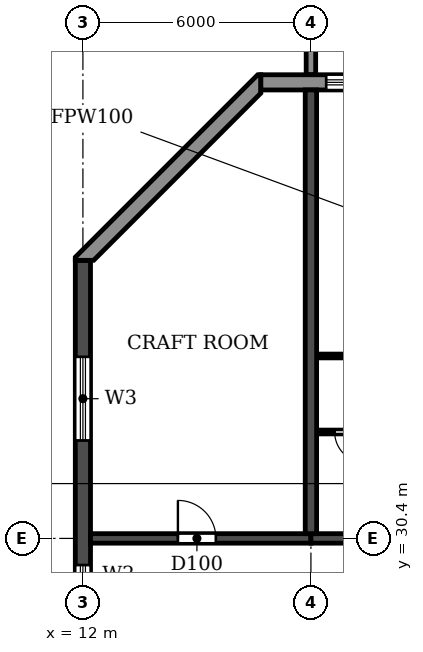
"""IFC4 building model, lengths in metres.
Left out: names, types, materials, properties, quantities, classifications, styles, units other than length and angle.
Written with IfcOpenShell. Run it as: python <this file> out.ifc"""

import sys

from ifc_helpers import new_model, si_unit, direction, frame, frame_2d, origin, place, context, subcontext, project, spatial, polyline, rectangle, outline, extrude, source, transform, mapped, element, fill, save


model = new_model("IFC4")
c1 = context("Model", 3, precision=1e-05, world=origin(), true_north=direction((0.0, 1.0)))
c2 = subcontext(c1, "Body", "Model", "MODEL_VIEW")
j1 = project(units=[si_unit("LENGTHUNIT", "METRE"), si_unit("PLANEANGLEUNIT", "RADIAN")], contexts=[c1])
p1 = place(None, origin())
s1 = spatial("IfcSite", under=j1, at=p1, CompositionType="ELEMENT")
p2 = place(p1, origin())
s2 = spatial("IfcBuilding", under=s1, at=p2, CompositionType="ELEMENT")
p3 = place(p2, frame((0.0, 0.0, 125.7)))
s3 = spatial("IfcBuildingStorey", under=s2, at=p3, CompositionType="ELEMENT", Elevation=125.7)
p4 = place(p3, frame((18.0, 30.525, 0.0), z_axis=(0.0, 0.0, 1.0), x_axis=(0.0, 1.0, 0.0)))
e1 = element("IfcWall", 1, at=p4, inside=s3, PredefinedType="SHEAR", context=c2, shape_type="SweptSolid", body=[
    extrude(rectangle(XDim=11.675, YDim=0.3, at=frame_2d((5.837, 0.0))), origin(), (0.0, 0.0, 1.0), 3.07),
])
p5 = place(p3, frame((12.0, 4.683, 0.0), z_axis=(0.0, 0.0, 1.0), x_axis=(0.0, 1.0, 0.0)))
e2 = element("IfcWall", 2, at=p5, inside=s3, PredefinedType="SHEAR", context=c2, shape_type="SweptSolid", body=[
    extrude(rectangle(XDim=33.034, YDim=0.4, at=frame_2d((16.517, 0.0))), origin(), (0.0, 0.0, 1.0), 3.07),
])
p6 = place(p5, frame((23.817, 0.0, 0.9)))
e3 = element("IfcOpeningElement", 3, at=p6, cuts=e2, PredefinedType="OPENING", context=c2, shape_type="SweptSolid", body=[
    extrude(rectangle(XDim=1.2, YDim=1.5, at=frame_2d((0.6, 0.75))), frame((0.0, 0.21, 0.0), z_axis=(0.0, -1.0, 0.0), x_axis=(1.0, 0.0, 0.0)), (0.0, 0.0, 1.0), 0.42),
])
p7 = place(p5, frame((8.017, 0.0, 0.9)))
e4 = element("IfcOpeningElement", 4, at=p7, cuts=e2, PredefinedType="OPENING", context=c2, shape_type="SweptSolid", body=[
    extrude(rectangle(XDim=1.2, YDim=1.5, at=frame_2d((0.6, 0.75))), frame((0.0, 0.21, 0.0), z_axis=(0.0, -1.0, 0.0), x_axis=(1.0, 0.0, 0.0)), (0.0, 0.0, 1.0), 0.42),
])
p8 = place(p5, frame((28.293, 0.0, 0.6)))
e5 = element("IfcOpeningElement", 5, at=p8, cuts=e2, PredefinedType="OPENING", context=c2, shape_type="SweptSolid", body=[
    extrude(rectangle(XDim=2.2, YDim=1.8, at=frame_2d((1.1, 0.9))), frame((0.0, 0.21, 0.0), z_axis=(0.0, -1.0, 0.0), x_axis=(1.0, 0.0, 0.0)), (0.0, 0.0, 1.0), 0.42),
])
p9 = place(p5, frame((2.541, 0.0, 0.6)))
e6 = element("IfcOpeningElement", 6, at=p9, cuts=e2, PredefinedType="OPENING", context=c2, shape_type="SweptSolid", body=[
    extrude(rectangle(XDim=2.2, YDim=1.8, at=frame_2d((1.1, 0.9))), frame((0.0, 0.21, 0.0), z_axis=(0.0, -1.0, 0.0), x_axis=(1.0, 0.0, 0.0)), (0.0, 0.0, 1.0), 0.42),
])
p10 = place(p5, frame((12.817, 0.0, 0.6)))
e7 = element("IfcOpeningElement", 7, at=p10, cuts=e2, PredefinedType="OPENING", context=c2, shape_type="SweptSolid", body=[
    extrude(rectangle(XDim=2.2, YDim=1.8, at=frame_2d((1.1, 0.9))), frame((0.0, 0.21, 0.0), z_axis=(0.0, -1.0, 0.0), x_axis=(1.0, 0.0, 0.0)), (0.0, 0.0, 1.0), 0.42),
])
p11 = place(p3, frame((12.2, 30.4, 0.0), z_axis=(0.0, 0.0, 1.0), x_axis=(1.0, 0.0, 0.0)))
e8 = element("IfcWall", 8, at=p11, inside=s3, PredefinedType="SHEAR", context=c2, shape_type="SweptSolid", body=[
    extrude(rectangle(XDim=5.8, YDim=0.25, at=frame_2d((2.9, 0.0))), origin(), (0.0, 0.0, 1.0), 2.47),
])
p12 = place(p11, frame((2.3, 0.0, 0.0)))
e9 = element("IfcOpeningElement", 9, at=p12, cuts=e8, PredefinedType="OPENING", context=c2, shape_type="SweptSolid", body=[
    extrude(rectangle(XDim=1.0, YDim=2.1, at=frame_2d((0.5, 1.05))), frame((0.0, 0.135, 0.0), z_axis=(0.0, -1.0, 0.0), x_axis=(1.0, 0.0, 0.0)), (0.0, 0.0, 1.0), 0.27),
])
p13 = place(p3, frame((18.0, 30.4, 0.0), z_axis=(0.0, 0.0, 1.0), x_axis=(1.0, 0.0, 0.0)))
e10 = element("IfcWall", 10, at=p13, inside=s3, PredefinedType="SHEAR", context=c2, shape_type="SweptSolid", body=[
    extrude(rectangle(XDim=6.0, YDim=0.25, at=frame_2d((3.0, 0.0))), origin(), (0.0, 0.0, 1.0), 2.47),
])
p14 = place(p13, frame((2.45, 0.0, 0.0)))
e11 = element("IfcOpeningElement", 11, at=p14, cuts=e10, PredefinedType="OPENING", context=c2, shape_type="SweptSolid", body=[
    extrude(rectangle(XDim=1.0, YDim=2.1, at=frame_2d((0.5, 1.05))), frame((0.0, 0.135, 0.0), z_axis=(0.0, -1.0, 0.0), x_axis=(1.0, 0.0, 0.0)), (0.0, 0.0, 1.0), 0.27),
])
p15 = place(p3, frame((85.317, 42.4, 0.0), z_axis=(0.0, 0.0, 1.0), x_axis=(-1.0, 0.0, 0.0)))
e12 = element("IfcWall", 12, at=p15, inside=s3, PredefinedType="STANDARD", context=c2, shape_type="SweptSolid", body=[
    extrude(rectangle(XDim=68.634, YDim=0.4, at=frame_2d((34.317, 0.0))), origin(), (0.0, 0.0, 1.0), 3.07),
])
p16 = place(p15, frame((64.717, 0.0, 0.9)))
e13 = element("IfcOpeningElement", 13, at=p16, cuts=e12, PredefinedType="OPENING", context=c2, shape_type="SweptSolid", body=[
    extrude(rectangle(XDim=2.2, YDim=1.5, at=frame_2d((1.1, 0.75))), frame((0.0, 0.21, 0.0), z_axis=(0.0, -1.0, 0.0), x_axis=(1.0, 0.0, 0.0)), (0.0, 0.0, 1.0), 0.42),
])
p17 = place(p15, frame((61.917, 0.0, 0.0)))
e14 = element("IfcOpeningElement", 14, at=p17, cuts=e12, PredefinedType="OPENING", context=c2, shape_type="SweptSolid", body=[
    extrude(rectangle(XDim=1.8, YDim=2.4, at=frame_2d((0.9, 1.2))), frame((0.0, 0.21, 0.0), z_axis=(0.0, -1.0, 0.0), x_axis=(1.0, 0.0, 0.0)), (0.0, 0.0, 1.0), 0.42),
])
p18 = place(p15, frame((58.717, 0.0, 0.9)))
e15 = element("IfcOpeningElement", 15, at=p18, cuts=e12, PredefinedType="OPENING", context=c2, shape_type="SweptSolid", body=[
    extrude(rectangle(XDim=2.2, YDim=1.5, at=frame_2d((1.1, 0.75))), frame((0.0, 0.21, 0.0), z_axis=(0.0, -1.0, 0.0), x_axis=(1.0, 0.0, 0.0)), (0.0, 0.0, 1.0), 0.42),
])
p19 = place(p15, frame((55.917, 0.0, 0.0)))
e16 = element("IfcOpeningElement", 16, at=p19, cuts=e12, PredefinedType="OPENING", context=c2, shape_type="SweptSolid", body=[
    extrude(rectangle(XDim=1.8, YDim=2.4, at=frame_2d((0.9, 1.2))), frame((0.0, 0.21, 0.0), z_axis=(0.0, -1.0, 0.0), x_axis=(1.0, 0.0, 0.0)), (0.0, 0.0, 1.0), 0.42),
])
p20 = place(p15, frame((52.717, 0.0, 0.9)))
e17 = element("IfcOpeningElement", 17, at=p20, cuts=e12, PredefinedType="OPENING", context=c2, shape_type="SweptSolid", body=[
    extrude(rectangle(XDim=2.2, YDim=1.5, at=frame_2d((1.1, 0.75))), frame((0.0, 0.21, 0.0), z_axis=(0.0, -1.0, 0.0), x_axis=(1.0, 0.0, 0.0)), (0.0, 0.0, 1.0), 0.42),
])
p21 = place(p15, frame((49.917, 0.0, 0.0)))
e18 = element("IfcOpeningElement", 18, at=p21, cuts=e12, PredefinedType="OPENING", context=c2, shape_type="SweptSolid", body=[
    extrude(rectangle(XDim=1.8, YDim=2.4, at=frame_2d((0.9, 1.2))), frame((0.0, 0.21, 0.0), z_axis=(0.0, -1.0, 0.0), x_axis=(1.0, 0.0, 0.0)), (0.0, 0.0, 1.0), 0.42),
])
p22 = place(p15, frame((46.717, 0.0, 0.9)))
e19 = element("IfcOpeningElement", 19, at=p22, cuts=e12, PredefinedType="OPENING", context=c2, shape_type="SweptSolid", body=[
    extrude(rectangle(XDim=2.2, YDim=1.5, at=frame_2d((1.1, 0.75))), frame((0.0, 0.21, 0.0), z_axis=(0.0, -1.0, 0.0), x_axis=(1.0, 0.0, 0.0)), (0.0, 0.0, 1.0), 0.42),
])
p23 = place(p15, frame((43.917, 0.0, 0.0)))
e20 = element("IfcOpeningElement", 20, at=p23, cuts=e12, PredefinedType="OPENING", context=c2, shape_type="SweptSolid", body=[
    extrude(rectangle(XDim=1.8, YDim=2.4, at=frame_2d((0.9, 1.2))), frame((0.0, 0.21, 0.0), z_axis=(0.0, -1.0, 0.0), x_axis=(1.0, 0.0, 0.0)), (0.0, 0.0, 1.0), 0.42),
])
p24 = place(p15, frame((40.717, 0.0, 0.9)))
e21 = element("IfcOpeningElement", 21, at=p24, cuts=e12, PredefinedType="OPENING", context=c2, shape_type="SweptSolid", body=[
    extrude(rectangle(XDim=2.2, YDim=1.5, at=frame_2d((1.1, 0.75))), frame((0.0, 0.21, 0.0), z_axis=(0.0, -1.0, 0.0), x_axis=(1.0, 0.0, 0.0)), (0.0, 0.0, 1.0), 0.42),
])
p25 = place(p15, frame((37.717, 0.0, 0.9)))
e22 = element("IfcOpeningElement", 22, at=p25, cuts=e12, PredefinedType="OPENING", context=c2, shape_type="SweptSolid", body=[
    extrude(rectangle(XDim=2.2, YDim=1.5, at=frame_2d((1.1, 0.75))), frame((0.0, 0.21, 0.0), z_axis=(0.0, -1.0, 0.0), x_axis=(1.0, 0.0, 0.0)), (0.0, 0.0, 1.0), 0.42),
])
p26 = place(p15, frame((34.917, 0.0, 0.0)))
e23 = element("IfcOpeningElement", 23, at=p26, cuts=e12, PredefinedType="OPENING", context=c2, shape_type="SweptSolid", body=[
    extrude(rectangle(XDim=1.8, YDim=2.4, at=frame_2d((0.9, 1.2))), frame((0.0, 0.21, 0.0), z_axis=(0.0, -1.0, 0.0), x_axis=(1.0, 0.0, 0.0)), (0.0, 0.0, 1.0), 0.42),
])
p27 = place(p15, frame((31.717, 0.0, 0.9)))
e24 = element("IfcOpeningElement", 24, at=p27, cuts=e12, PredefinedType="OPENING", context=c2, shape_type="SweptSolid", body=[
    extrude(rectangle(XDim=2.2, YDim=1.5, at=frame_2d((1.1, 0.75))), frame((0.0, 0.21, 0.0), z_axis=(0.0, -1.0, 0.0), x_axis=(1.0, 0.0, 0.0)), (0.0, 0.0, 1.0), 0.42),
])
p28 = place(p15, frame((28.717, 0.0, 0.9)))
e25 = element("IfcOpeningElement", 25, at=p28, cuts=e12, PredefinedType="OPENING", context=c2, shape_type="SweptSolid", body=[
    extrude(rectangle(XDim=2.2, YDim=1.5, at=frame_2d((1.1, 0.75))), frame((0.0, 0.21, 0.0), z_axis=(0.0, -1.0, 0.0), x_axis=(1.0, 0.0, 0.0)), (0.0, 0.0, 1.0), 0.42),
])
p29 = place(p15, frame((25.717, 0.0, 0.9)))
e26 = element("IfcOpeningElement", 26, at=p29, cuts=e12, PredefinedType="OPENING", context=c2, shape_type="SweptSolid", body=[
    extrude(rectangle(XDim=2.2, YDim=1.5, at=frame_2d((1.1, 0.75))), frame((0.0, 0.21, 0.0), z_axis=(0.0, -1.0, 0.0), x_axis=(1.0, 0.0, 0.0)), (0.0, 0.0, 1.0), 0.42),
])
p30 = place(p15, frame((22.717, 0.0, 0.9)))
e27 = element("IfcOpeningElement", 27, at=p30, cuts=e12, PredefinedType="OPENING", context=c2, shape_type="SweptSolid", body=[
    extrude(rectangle(XDim=2.2, YDim=1.5, at=frame_2d((1.1, 0.75))), frame((0.0, 0.21, 0.0), z_axis=(0.0, -1.0, 0.0), x_axis=(1.0, 0.0, 0.0)), (0.0, 0.0, 1.0), 0.42),
])
p31 = place(p15, frame((19.917, 0.0, 0.0)))
e28 = element("IfcOpeningElement", 28, at=p31, cuts=e12, PredefinedType="OPENING", context=c2, shape_type="SweptSolid", body=[
    extrude(rectangle(XDim=1.8, YDim=2.4, at=frame_2d((0.9, 1.2))), frame((0.0, 0.21, 0.0), z_axis=(0.0, -1.0, 0.0), x_axis=(1.0, 0.0, 0.0)), (0.0, 0.0, 1.0), 0.42),
])
p32 = place(p15, frame((16.917, 0.0, 0.0)))
e29 = element("IfcOpeningElement", 29, at=p32, cuts=e12, PredefinedType="OPENING", context=c2, shape_type="SweptSolid", body=[
    extrude(rectangle(XDim=1.8, YDim=2.4, at=frame_2d((0.9, 1.2))), frame((0.0, 0.21, 0.0), z_axis=(0.0, -1.0, 0.0), x_axis=(1.0, 0.0, 0.0)), (0.0, 0.0, 1.0), 0.42),
])
p33 = place(p15, frame((13.717, 0.0, 0.9)))
e30 = element("IfcOpeningElement", 30, at=p33, cuts=e12, PredefinedType="OPENING", context=c2, shape_type="SweptSolid", body=[
    extrude(rectangle(XDim=2.2, YDim=1.5, at=frame_2d((1.1, 0.75))), frame((0.0, 0.21, 0.0), z_axis=(0.0, -1.0, 0.0), x_axis=(1.0, 0.0, 0.0)), (0.0, 0.0, 1.0), 0.42),
])
p34 = place(p15, frame((10.717, 0.0, 0.9)))
e31 = element("IfcOpeningElement", 31, at=p34, cuts=e12, PredefinedType="OPENING", context=c2, shape_type="SweptSolid", body=[
    extrude(rectangle(XDim=2.2, YDim=1.5, at=frame_2d((1.1, 0.75))), frame((0.0, 0.21, 0.0), z_axis=(0.0, -1.0, 0.0), x_axis=(1.0, 0.0, 0.0)), (0.0, 0.0, 1.0), 0.42),
])
p35 = place(p15, frame((7.717, 0.0, 0.9)))
e32 = element("IfcOpeningElement", 32, at=p35, cuts=e12, PredefinedType="OPENING", context=c2, shape_type="SweptSolid", body=[
    extrude(rectangle(XDim=2.2, YDim=1.5, at=frame_2d((1.1, 0.75))), frame((0.0, 0.21, 0.0), z_axis=(0.0, -1.0, 0.0), x_axis=(1.0, 0.0, 0.0)), (0.0, 0.0, 1.0), 0.42),
])
p36 = place(p15, frame((4.917, 0.0, 0.0)))
e33 = element("IfcOpeningElement", 33, at=p36, cuts=e12, PredefinedType="OPENING", context=c2, shape_type="SweptSolid", body=[
    extrude(rectangle(XDim=1.8, YDim=2.4, at=frame_2d((0.9, 1.2))), frame((0.0, 0.21, 0.0), z_axis=(0.0, -1.0, 0.0), x_axis=(1.0, 0.0, 0.0)), (0.0, 0.0, 1.0), 0.42),
])
p37 = place(p15, frame((1.717, 0.0, 0.9)))
e34 = element("IfcOpeningElement", 34, at=p37, cuts=e12, PredefinedType="OPENING", context=c2, shape_type="SweptSolid", body=[
    extrude(rectangle(XDim=2.2, YDim=1.5, at=frame_2d((1.1, 0.75))), frame((0.0, 0.21, 0.0), z_axis=(0.0, -1.0, 0.0), x_axis=(1.0, 0.0, 0.0)), (0.0, 0.0, 1.0), 0.42),
])
p38 = place(p3, origin())
e35 = element("IfcWall", 35, at=p38, inside=s3, PredefinedType="STANDARD", context=c2, shape_type="SweptSolid", body=[
    extrude(outline(polyline([(16.683, 42.6), (16.6, 42.6), (11.8, 37.8), (11.8, 37.717), (12.283, 37.717), (16.683, 42.117), (16.683, 42.6)])), origin(), (0.0, 0.0, 1.0), 3.07),
])
m1 = source(origin(), c2, "Body", "SweptSolid", [
    extrude(outline(polyline([(0.0, 0.0), (0.25, 0.0), (0.25, 3.1), (0.0, 3.1), (0.0, 0.0)])), origin(), (0.0, 0.0, 1.0), 3.1),
])
p39 = place(p3, frame((17.875, 42.6, 0.0)))
e36 = element("IfcWall", 36, at=p39, inside=s3, PredefinedType="STANDARD", context=c2, shape_type="MappedRepresentation", body=[
    mapped(m1, transform((0.0, 0.0, 0.0))),
])
p40 = place(p3, frame((18.16, 33.2, 0.0), z_axis=(0.0, 0.0, 1.0), x_axis=(1.0, 0.0, 0.0)))
e37 = element("IfcWall", 37, at=p40, inside=s3, PredefinedType="PARTITIONING", context=c2, shape_type="SweptSolid", body=[
    extrude(rectangle(XDim=1.94, YDim=0.1, at=frame_2d((0.97, 0.0))), origin(), (0.0, 0.0, 1.0), 3.07),
])
p41 = place(p40, frame((0.465, 0.0, 0.0)))
e38 = element("IfcOpeningElement", 38, at=p41, cuts=e37, PredefinedType="OPENING", context=c2, shape_type="SweptSolid", body=[
    extrude(rectangle(XDim=0.8, YDim=2.1, at=frame_2d((0.4, 1.05))), frame((0.0, 0.06, 0.0), z_axis=(0.0, -1.0, 0.0), x_axis=(1.0, 0.0, 0.0)), (0.0, 0.0, 1.0), 0.12),
])
p42 = place(p3, frame((18.16, 35.2, 0.0), z_axis=(0.0, 0.0, 1.0), x_axis=(1.0, 0.0, 0.0)))
e39 = element("IfcWall", 39, at=p42, inside=s3, PredefinedType="PARTITIONING", context=c2, shape_type="SweptSolid", body=[
    extrude(rectangle(XDim=2.89, YDim=0.1, at=frame_2d((1.445, 0.0))), origin(), (0.0, 0.0, 1.0), 3.07),
])
p43 = place(p42, frame((1.44, 0.0, 0.0)))
e40 = element("IfcOpeningElement", 40, at=p43, cuts=e39, PredefinedType="OPENING", context=c2, shape_type="SweptSolid", body=[
    extrude(rectangle(XDim=0.9, YDim=2.1, at=frame_2d((0.45, 1.05))), frame((0.0, 0.06, 0.0), z_axis=(0.0, -1.0, 0.0), x_axis=(1.0, 0.0, 0.0)), (0.0, 0.0, 1.0), 0.12),
])
p44 = place(p16, origin())
e41 = element("IfcWindow", 41, at=p44, inside=s3, PartitioningType="DOUBLE_PANEL_HORIZONTAL", PredefinedType="WINDOW", context=c2, shape_type="SweptSolid", body=[
    extrude(rectangle(XDim=2.2, YDim=1.5, at=frame_2d((1.1, 0.75))), frame((0.0, 0.03, 0.0), z_axis=(0.0, -1.0, 0.0), x_axis=(1.0, 0.0, 0.0)), (0.0, 0.0, 1.0), 0.06),
])
fill(e13, e41)
p45 = place(p6, origin())
e42 = element("IfcWindow", 42, at=p45, inside=s3, PartitioningType="SINGLE_PANEL", PredefinedType="WINDOW", context=c2, shape_type="SweptSolid", body=[
    extrude(rectangle(XDim=1.2, YDim=1.5, at=frame_2d((0.6, 0.75))), frame((0.0, 0.03, 0.0), z_axis=(0.0, -1.0, 0.0), x_axis=(1.0, 0.0, 0.0)), (0.0, 0.0, 1.0), 0.06),
])
fill(e3, e42)
p46 = place(p8, origin())
e43 = element("IfcWindow", 43, at=p46, inside=s3, PartitioningType="DOUBLE_PANEL_HORIZONTAL", PredefinedType="WINDOW", context=c2, shape_type="SweptSolid", body=[
    extrude(rectangle(XDim=2.2, YDim=1.8, at=frame_2d((1.1, 0.9))), frame((0.0, 0.03, 0.0), z_axis=(0.0, -1.0, 0.0), x_axis=(1.0, 0.0, 0.0)), (0.0, 0.0, 1.0), 0.06),
])
fill(e5, e43)
p47 = place(p12, origin())
e44 = element("IfcDoor", 44, at=p47, inside=s3, OperationType="SINGLE_SWING_LEFT", PredefinedType="DOOR", context=c2, shape_type="SweptSolid", body=[
    extrude(rectangle(XDim=1.0, YDim=2.1, at=frame_2d((0.5, 1.05))), frame((0.0, 0.025, 0.0), z_axis=(0.0, -1.0, 0.0), x_axis=(1.0, 0.0, 0.0)), (0.0, 0.0, 1.0), 0.05),
])
fill(e9, e44)
p48 = place(p41, frame((0.8, 0.0, 0.0), z_axis=(0.0, 0.0, 1.0), x_axis=(-1.0, 0.0, 0.0)))
e45 = element("IfcDoor", 45, at=p48, inside=s3, OperationType="SINGLE_SWING_LEFT", PredefinedType="DOOR", context=c2, shape_type="SweptSolid", body=[
    extrude(rectangle(XDim=0.8, YDim=2.1, at=frame_2d((0.4, 1.05))), frame((0.0, 0.025, 0.0), z_axis=(0.0, -1.0, 0.0), x_axis=(1.0, 0.0, 0.0)), (0.0, 0.0, 1.0), 0.05),
])
fill(e38, e45)
save(model, sys.argv[1])
